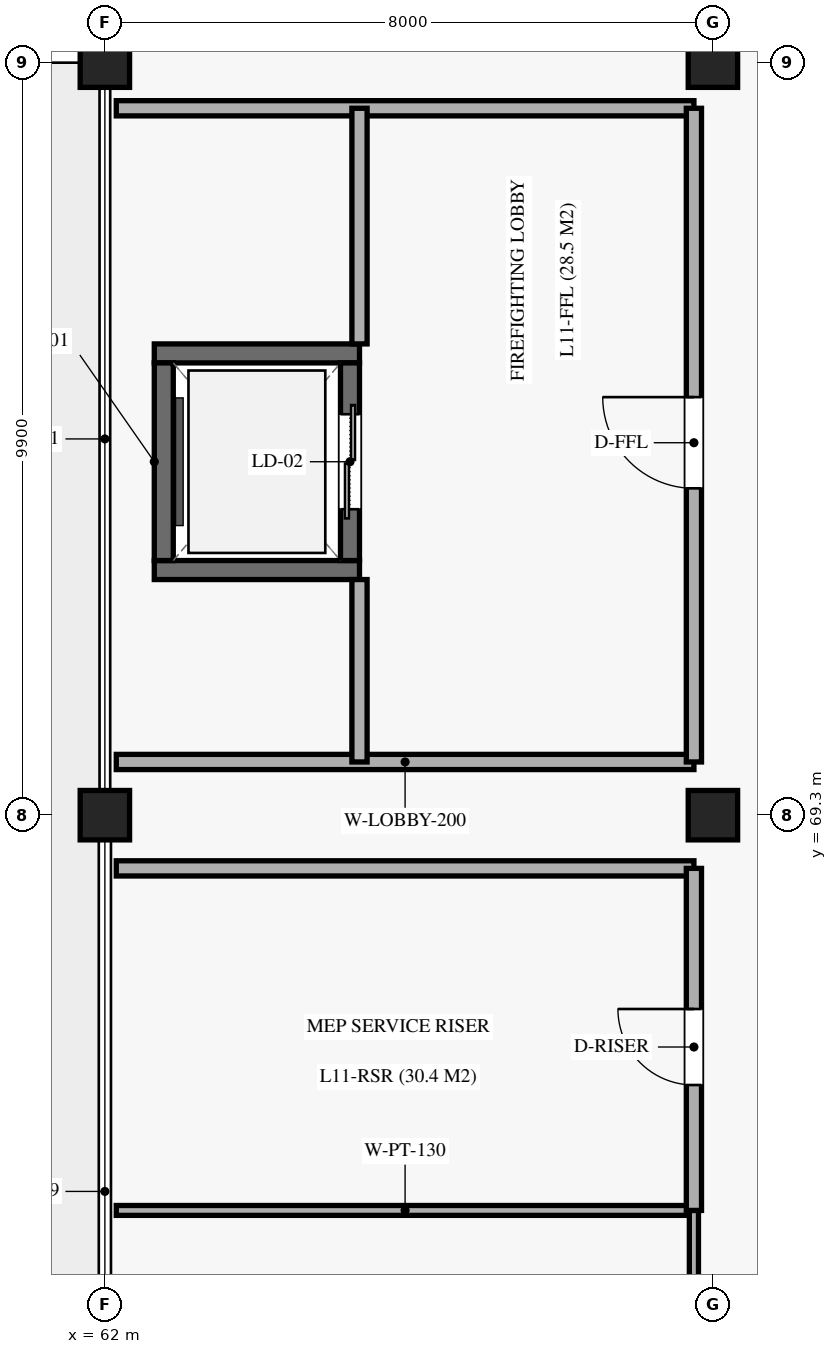
"""IFC4 building model, lengths in metres.
Left out: names, types, materials, properties, quantities, classifications, styles, units other than length and angle.
Written with IfcOpenShell. Run it as: python <this file> out.ifc"""

import sys

from ifc_helpers import new_model, si_unit, direction, frame, frame_2d, origin, origin_2d, place, context, subcontext, project, spatial, rectangle, extrude, element, fill, save


model = new_model("IFC4")
c1 = context("Model", 3, precision=1e-05, world=origin(), true_north=direction((0.0, 1.0)))
c2 = subcontext(c1, "Body", "Model", "MODEL_VIEW")
j1 = project(units=[si_unit("LENGTHUNIT", "METRE"), si_unit("PLANEANGLEUNIT", "RADIAN")], contexts=[c1])
p1 = place(None, origin())
s1 = spatial("IfcSite", under=j1, at=p1, CompositionType="ELEMENT")
p2 = place(p1, origin())
s2 = spatial("IfcBuilding", under=s1, at=p2, CompositionType="ELEMENT")
p3 = place(p2, frame((0.0, 0.0, 57.12)))
s3 = spatial("IfcBuildingStorey", under=s2, at=p3, CompositionType="ELEMENT", Elevation=57.12)
for number, where, z_axis, x_axis in (
    (1, (62.0, 69.3, 0.0), (0.0, 0.0, 1.0), (1.0, 0.0, 0.0)),
    (2, (62.0, 79.2, 0.0), (0.0, 0.0, 1.0), (1.0, 0.0, 0.0)),
    (3, (70.0, 69.3, 0.0), (0.0, 0.0, 1.0), (1.0, 0.0, 0.0)),
    (4, (70.0, 79.2, 0.0), (0.0, 0.0, 1.0), (1.0, 0.0, 0.0)),
):
    element("IfcColumn", number, at=place(p3, frame(where, z_axis=z_axis, x_axis=x_axis)), inside=s3, PredefinedType="COLUMN", context=c2, shape_type="SweptSolid", body=[
        extrude(rectangle(XDim=0.65, YDim=0.65, at=origin_2d()), origin(), (0.0, 0.0, 1.0), 5.1),
    ])
for number, where, z_axis, x_axis in (
    (5, (62.65, 72.525, 0.0), (0.0, 0.0, 1.0), (1.0, 0.0, 0.0)),
    (6, (62.65, 75.375, 0.0), (0.0, 0.0, 1.0), (1.0, 0.0, 0.0)),
):
    element("IfcWall", number, at=place(p3, frame(where, z_axis=z_axis, x_axis=x_axis)), inside=s3, PredefinedType="SOLIDWALL", context=c2, shape_type="SweptSolid", body=[
        extrude(rectangle(XDim=2.7, YDim=0.25, at=frame_2d((1.35, 0.0))), origin(), (0.0, 0.0, 1.0), 4.85),
    ])
p4 = place(p3, frame((62.775, 72.65, 0.0), z_axis=(0.0, 0.0, 1.0), x_axis=(0.0, 1.0, 0.0)))
e7 = element("IfcWall", 7, at=p4, inside=s3, PredefinedType="SOLIDWALL", context=c2, shape_type="SweptSolid", body=[
    extrude(rectangle(XDim=2.6, YDim=0.25, at=frame_2d((1.3, 0.0))), origin(), (0.0, 0.0, 1.0), 4.85),
])
p5 = place(p3, frame((65.225, 72.65, 0.0), z_axis=(0.0, 0.0, 1.0), x_axis=(0.0, 1.0, 0.0)))
e8 = element("IfcWall", 8, at=p5, inside=s3, PredefinedType="SOLIDWALL", context=c2, shape_type="SweptSolid", body=[
    extrude(rectangle(XDim=2.6, YDim=0.25, at=frame_2d((1.3, 0.0))), origin(), (0.0, 0.0, 1.0), 4.85),
])
p6 = place(p5, frame((0.675, 0.0, 0.0)))
e9 = element("IfcOpeningElement", 9, at=p6, cuts=e8, PredefinedType="OPENING", context=c2, shape_type="SweptSolid", body=[
    extrude(rectangle(XDim=1.25, YDim=2.2, at=frame_2d((0.625, 1.1))), frame((0.0, 0.135, 0.0), z_axis=(0.0, -1.0, 0.0), x_axis=(1.0, 0.0, 0.0)), (0.0, 0.0, 1.0), 0.27),
])
for number, where, z_axis, x_axis in (
    (10, (62.15, 70.0, 0.0), (0.0, 0.0, 1.0), (1.0, 0.0, 0.0)),
    (11, (62.15, 78.6, 0.0), (0.0, 0.0, 1.0), (1.0, 0.0, 0.0)),
):
    element("IfcWall", number, at=place(p3, frame(where, z_axis=z_axis, x_axis=x_axis)), inside=s3, PredefinedType="SOLIDWALL", context=c2, shape_type="SweptSolid", body=[
        extrude(rectangle(XDim=7.6, YDim=0.2, at=frame_2d((3.8, 0.0))), origin(), (0.0, 0.0, 1.0), 3.99),
    ])
p7 = place(p3, frame((65.35, 70.0, 0.0), z_axis=(0.0, 0.0, 1.0), x_axis=(0.0, 1.0, 0.0)))
e12 = element("IfcWall", 12, at=p7, inside=s3, PredefinedType="SOLIDWALL", context=c2, shape_type="SweptSolid", body=[
    extrude(rectangle(XDim=2.4, YDim=0.2, at=frame_2d((1.2, 0.0))), origin(), (0.0, 0.0, 1.0), 3.99),
])
p8 = place(p3, frame((65.35, 75.5, 0.0), z_axis=(0.0, 0.0, 1.0), x_axis=(0.0, 1.0, 0.0)))
e13 = element("IfcWall", 13, at=p8, inside=s3, PredefinedType="SOLIDWALL", context=c2, shape_type="SweptSolid", body=[
    extrude(rectangle(XDim=3.1, YDim=0.2, at=frame_2d((1.55, 0.0))), origin(), (0.0, 0.0, 1.0), 3.99),
])
p9 = place(p3, frame((69.75, 70.0, 0.0), z_axis=(0.0, 0.0, 1.0), x_axis=(0.0, 1.0, 0.0)))
e14 = element("IfcWall", 14, at=p9, inside=s3, PredefinedType="SOLIDWALL", context=c2, shape_type="SweptSolid", body=[
    extrude(rectangle(XDim=8.6, YDim=0.2, at=frame_2d((4.3, 0.0))), origin(), (0.0, 0.0, 1.0), 3.99),
])
p10 = place(p9, frame((3.6, 0.0, 0.0)))
e15 = element("IfcOpeningElement", 15, at=p10, cuts=e14, PredefinedType="OPENING", context=c2, shape_type="SweptSolid", body=[
    extrude(rectangle(XDim=1.2, YDim=2.25, at=frame_2d((0.6, 1.125))), frame((0.0, 0.11, 0.0), z_axis=(0.0, -1.0, 0.0), x_axis=(1.0, 0.0, 0.0)), (0.0, 0.0, 1.0), 0.22),
])
p11 = place(p3, frame((62.15, 64.1, 0.0), z_axis=(0.0, 0.0, 1.0), x_axis=(1.0, 0.0, 0.0)))
e16 = element("IfcWall", 16, at=p11, inside=s3, PredefinedType="PARTITIONING", context=c2, shape_type="SweptSolid", body=[
    extrude(rectangle(XDim=7.6, YDim=0.13, at=frame_2d((3.8, 0.0))), origin(), (0.0, 0.0, 1.0), 3.99),
])
p12 = place(p3, frame((69.75, 59.9, 0.0), z_axis=(0.0, 0.0, 1.0), x_axis=(0.0, 1.0, 0.0)))
e17 = element("IfcWall", 17, at=p12, inside=s3, PredefinedType="PARTITIONING", context=c2, shape_type="SweptSolid", body=[
    extrude(rectangle(XDim=4.2, YDim=0.12, at=frame_2d((2.1, 0.0))), origin(), (0.0, 0.0, 1.0), 3.99),
])
p13 = place(p12, frame((1.5, 0.0, 0.0)))
e18 = element("IfcOpeningElement", 18, at=p13, cuts=e17, PredefinedType="OPENING", context=c2, shape_type="SweptSolid", body=[
    extrude(rectangle(XDim=0.95, YDim=2.1, at=frame_2d((0.475, 1.05))), frame((0.0, 0.07, 0.0), z_axis=(0.0, -1.0, 0.0), x_axis=(1.0, 0.0, 0.0)), (0.0, 0.0, 1.0), 0.14),
])
p14 = place(p3, frame((62.15, 68.6, 0.0), z_axis=(0.0, 0.0, 1.0), x_axis=(1.0, 0.0, 0.0)))
e19 = element("IfcWall", 19, at=p14, inside=s3, PredefinedType="SOLIDWALL", context=c2, shape_type="SweptSolid", body=[
    extrude(rectangle(XDim=7.6, YDim=0.2, at=frame_2d((3.8, 0.0))), origin(), (0.0, 0.0, 1.0), 3.99),
])
p15 = place(p3, frame((69.75, 64.1, 0.0), z_axis=(0.0, 0.0, 1.0), x_axis=(0.0, 1.0, 0.0)))
e20 = element("IfcWall", 20, at=p15, inside=s3, PredefinedType="SOLIDWALL", context=c2, shape_type="SweptSolid", body=[
    extrude(rectangle(XDim=4.5, YDim=0.2, at=frame_2d((2.25, 0.0))), origin(), (0.0, 0.0, 1.0), 3.99),
])
p16 = place(p15, frame((1.65, 0.0, 0.0)))
e21 = element("IfcOpeningElement", 21, at=p16, cuts=e20, PredefinedType="OPENING", context=c2, shape_type="SweptSolid", body=[
    extrude(rectangle(XDim=1.0, YDim=2.15, at=frame_2d((0.5, 1.075))), frame((0.0, 0.11, 0.0), z_axis=(0.0, -1.0, 0.0), x_axis=(1.0, 0.0, 0.0)), (0.0, 0.0, 1.0), 0.22),
])
p17 = place(p6, origin())
e22 = element("IfcDoor", 22, at=p17, inside=s3, OperationType="DOUBLE_DOOR_SLIDING", PredefinedType="DOOR", context=c2, shape_type="SweptSolid", body=[
    extrude(rectangle(XDim=1.25, YDim=2.2, at=frame_2d((0.625, 1.1))), frame((0.0, 0.025, 0.0), z_axis=(0.0, -1.0, 0.0), x_axis=(1.0, 0.0, 0.0)), (0.0, 0.0, 1.0), 0.05),
])
fill(e9, e22)
p18 = place(p10, origin())
e23 = element("IfcDoor", 23, at=p18, inside=s3, OperationType="SINGLE_SWING_RIGHT", PredefinedType="DOOR", context=c2, shape_type="SweptSolid", body=[
    extrude(rectangle(XDim=1.2, YDim=2.25, at=frame_2d((0.6, 1.125))), frame((0.0, 0.025, 0.0), z_axis=(0.0, -1.0, 0.0), x_axis=(1.0, 0.0, 0.0)), (0.0, 0.0, 1.0), 0.05),
])
fill(e15, e23)
p19 = place(p16, origin())
e24 = element("IfcDoor", 24, at=p19, inside=s3, OperationType="SINGLE_SWING_RIGHT", PredefinedType="DOOR", context=c2, shape_type="SweptSolid", body=[
    extrude(rectangle(XDim=1.0, YDim=2.15, at=frame_2d((0.5, 1.075))), frame((0.0, 0.025, 0.0), z_axis=(0.0, -1.0, 0.0), x_axis=(1.0, 0.0, 0.0)), (0.0, 0.0, 1.0), 0.05),
])
fill(e21, e24)
save(model, sys.argv[1])
